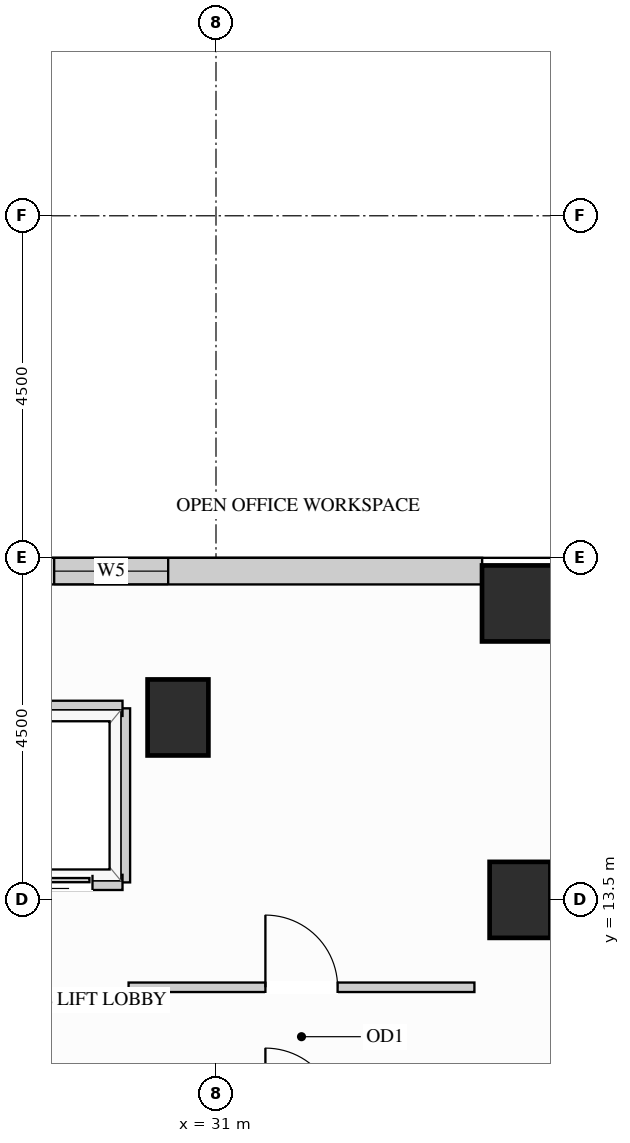
"""IFC4 building model, lengths in metres.
Left out: names, types, materials, properties, quantities, classifications, styles, units other than length and angle.
Written with IfcOpenShell. Run it as: python <this file> out.ifc"""

import sys

from ifc_helpers import new_model, si_unit, direction, frame, frame_2d, origin, origin_2d, place, context, subcontext, project, spatial, rectangle, extrude, source, transform, mapped, element, fill, save


model = new_model("IFC4")
c1 = context("Model", 3, precision=1e-05, world=origin(), true_north=direction((0.0, 1.0)))
c2 = subcontext(c1, "Body", "Model", "MODEL_VIEW")
j1 = project(units=[si_unit("LENGTHUNIT", "METRE"), si_unit("PLANEANGLEUNIT", "RADIAN")], contexts=[c1])
p1 = place(None, origin())
s1 = spatial("IfcSite", under=j1, at=p1, CompositionType="ELEMENT")
p2 = place(p1, origin())
s2 = spatial("IfcBuilding", under=s1, at=p2, CompositionType="ELEMENT")
p3 = place(p2, frame((0.0, 0.0, 204.3)))
s3 = spatial("IfcBuildingStorey", under=s2, at=p3, CompositionType="ELEMENT", Elevation=204.3)
m1 = source(origin(), c2, "Body", "SweptSolid", [
    extrude(rectangle(XDim=0.8, YDim=1.0, at=origin_2d()), origin(), (0.0, 0.0, 1.0), 3.32),
])
for number, where, z_axis, x_axis in (
    (1, (35.0, 13.5, 0.0), (0.0, 0.0, 1.0), (1.0, 0.0, 0.0)),
    (2, (30.5, 15.9, 0.0), (0.0, 0.0, 1.0), (1.0, 0.0, 0.0)),
):
    element("IfcColumn", number, at=place(p3, frame(where, z_axis=z_axis, x_axis=x_axis)), inside=s3, PredefinedType="COLUMN", context=c2, shape_type="MappedRepresentation", body=[
        mapped(m1, transform((0.0, 0.0, 0.0), x_axis=(1.0, 0.0, 0.0), y_axis=(0.0, 1.0, 0.0), z_axis=(0.0, 0.0, 1.0))),
    ])
m2 = source(origin(), c2, "Body", "SweptSolid", [
    extrude(rectangle(XDim=1.0, YDim=1.0, at=origin_2d()), origin(), (0.0, 0.0, 1.0), 3.32),
])
p4 = place(p3, frame((35.0, 17.4, 0.0), z_axis=(0.0, 0.0, 1.0), x_axis=(1.0, 0.0, 0.0)))
e3 = element("IfcColumn", 3, at=p4, inside=s3, PredefinedType="COLUMN", context=c2, shape_type="MappedRepresentation", body=[
    mapped(m2, transform((0.0, 0.0, 0.0), x_axis=(1.0, 0.0, 0.0), y_axis=(0.0, 1.0, 0.0), z_axis=(0.0, 0.0, 1.0))),
])
p5 = place(p3, frame((34.502, 17.825, 0.0), z_axis=(0.0, 0.0, 1.0), x_axis=(-1.0, 0.0, 0.0)))
e4 = element("IfcWall", 4, at=p5, inside=s3, PredefinedType="SOLIDWALL", context=c2, shape_type="SweptSolid", body=[
    extrude(rectangle(XDim=15.104, YDim=0.35, at=frame_2d((7.552, 0.0))), origin(), (0.0, 0.0, 1.0), 3.305),
])
p6 = place(p5, frame((4.131, 0.0, 0.78)))
e5 = element("IfcOpeningElement", 5, at=p6, cuts=e4, PredefinedType="OPENING", context=c2, shape_type="SweptSolid", body=[
    extrude(rectangle(XDim=1.5, YDim=2.0, at=frame_2d((0.75, 1.0))), frame((0.0, 0.185, 0.0), z_axis=(0.0, -1.0, 0.0), x_axis=(1.0, 0.0, 0.0)), (0.0, 0.0, 1.0), 0.37),
])
p7 = place(p5, frame((9.442, 0.0, 0.78)))
e6 = element("IfcOpeningElement", 6, at=p7, cuts=e4, PredefinedType="OPENING", context=c2, shape_type="SweptSolid", body=[
    extrude(rectangle(XDim=1.5, YDim=2.0, at=frame_2d((0.75, 1.0))), frame((0.0, 0.185, 0.0), z_axis=(0.0, -1.0, 0.0), x_axis=(1.0, 0.0, 0.0)), (0.0, 0.0, 1.0), 0.37),
])
p8 = place(p3, frame((29.85, 12.35, 0.0), z_axis=(0.0, 0.0, 1.0), x_axis=(1.0, 0.0, 0.0)))
e7 = element("IfcWall", 7, at=p8, inside=s3, PredefinedType="PARTITIONING", context=c2, shape_type="SweptSolid", body=[
    extrude(rectangle(XDim=4.55, YDim=0.125, at=frame_2d((2.275, 0.0))), origin(), (0.0, 0.0, 1.0), 3.305),
])
p9 = place(p8, frame((1.8, 0.0, 0.0)))
e8 = element("IfcOpeningElement", 8, at=p9, cuts=e7, PredefinedType="OPENING", context=c2, shape_type="SweptSolid", body=[
    extrude(rectangle(XDim=0.95, YDim=2.15, at=frame_2d((0.475, 1.075))), frame((0.0, 0.073, 0.0), z_axis=(0.0, -1.0, 0.0), x_axis=(1.0, 0.0, 0.0)), (0.0, 0.0, 1.0), 0.145),
])
m3 = source(origin(), c2, "Body", "SweptSolid", [
    extrude(rectangle(XDim=2.29, YDim=0.2, at=frame_2d((1.145, 0.0))), origin(), (0.0, 0.0, 1.0), 3.305),
])
p10 = place(p3, frame((29.77, 13.73, 0.0), z_axis=(0.0, 0.0, 1.0), x_axis=(0.0, 1.0, 0.0)))
e9 = element("IfcWall", 9, at=p10, inside=s3, PredefinedType="PARTITIONING", context=c2, shape_type="MappedRepresentation", body=[
    mapped(m3, transform((0.0, 0.0, 0.0), x_axis=(1.0, 0.0, 0.0), y_axis=(0.0, 1.0, 0.0), z_axis=(0.0, 0.0, 1.0))),
])
m4 = source(origin(), c2, "Body", "SweptSolid", [
    extrude(rectangle(XDim=1.89, YDim=0.2, at=frame_2d((0.945, 0.0))), origin(), (0.0, 0.0, 1.0), 2.693),
])
p11 = place(p3, frame((27.88, 16.02, 0.0), z_axis=(0.0, 0.0, 1.0), x_axis=(1.0, 0.0, 0.0)))
e10 = element("IfcWall", 10, at=p11, inside=s3, PredefinedType="PARTITIONING", context=c2, shape_type="MappedRepresentation", body=[
    mapped(m4, transform((0.0, 0.0, 0.0), x_axis=(1.0, 0.0, 0.0), y_axis=(0.0, 1.0, 0.0), z_axis=(0.0, 0.0, 1.0))),
])
p12 = place(p3, frame((27.88, 13.73, 0.0), z_axis=(0.0, 0.0, 1.0), x_axis=(1.0, 0.0, 0.0)))
e11 = element("IfcWall", 11, at=p12, inside=s3, PredefinedType="PARTITIONING", context=c2, shape_type="SweptSolid", body=[
    extrude(rectangle(XDim=1.89, YDim=0.2, at=frame_2d((0.945, 0.0))), origin(), (0.0, 0.0, 1.0), 2.386),
])
p13 = place(p12, frame((0.395, 0.0, 0.0)))
e12 = element("IfcOpeningElement", 12, at=p13, cuts=e11, PredefinedType="OPENING", context=c2, shape_type="SweptSolid", body=[
    extrude(rectangle(XDim=1.1, YDim=2.2, at=frame_2d((0.55, 1.1))), frame((0.0, 0.11, 0.0), z_axis=(0.0, -1.0, 0.0), x_axis=(1.0, 0.0, 0.0)), (0.0, 0.0, 1.0), 0.22),
])
m5 = source(origin(), c2, "Body", "SweptSolid", [
    extrude(rectangle(XDim=1.1, YDim=2.2, at=frame_2d((0.55, 1.1))), frame((0.0, 0.025, 0.0), z_axis=(0.0, -1.0, 0.0), x_axis=(1.0, 0.0, 0.0)), (0.0, 0.0, 1.0), 0.05),
])
p14 = place(p13, origin())
e13 = element("IfcDoor", 13, at=p14, inside=s3, OperationType="SLIDING_TO_LEFT", PredefinedType="DOOR", context=c2, shape_type="MappedRepresentation", body=[
    mapped(m5, transform((0.0, 0.0, 0.0), x_axis=(1.0, 0.0, 0.0), y_axis=(0.0, 1.0, 0.0), z_axis=(0.0, 0.0, 1.0))),
])
fill(e12, e13)
m6 = source(origin(), c2, "Body", "SweptSolid", [
    extrude(rectangle(XDim=0.95, YDim=2.15, at=frame_2d((0.475, 1.075))), frame((0.0, 0.025, 0.0), z_axis=(0.0, -1.0, 0.0), x_axis=(1.0, 0.0, 0.0)), (0.0, 0.0, 1.0), 0.05),
])
p15 = place(p9, origin())
e14 = element("IfcDoor", 14, at=p15, inside=s3, OperationType="SINGLE_SWING_LEFT", PredefinedType="DOOR", context=c2, shape_type="MappedRepresentation", body=[
    mapped(m6, transform((0.0, 0.0, 0.0), x_axis=(1.0, 0.0, 0.0), y_axis=(0.0, 1.0, 0.0), z_axis=(0.0, 0.0, 1.0))),
])
fill(e8, e14)
m7 = source(origin(), c2, "Body", "SweptSolid", [
    extrude(rectangle(XDim=1.5, YDim=2.0, at=frame_2d((0.75, 1.0))), frame((0.0, 0.03, 0.0), z_axis=(0.0, -1.0, 0.0), x_axis=(1.0, 0.0, 0.0)), (0.0, 0.0, 1.0), 0.06),
])
p16 = place(p6, origin())
e15 = element("IfcWindow", 15, at=p16, inside=s3, PartitioningType="SINGLE_PANEL", PredefinedType="WINDOW", context=c2, shape_type="MappedRepresentation", body=[
    mapped(m7, transform((0.0, 0.0, 0.0), x_axis=(1.0, 0.0, 0.0), y_axis=(0.0, 1.0, 0.0), z_axis=(0.0, 0.0, 1.0))),
])
fill(e5, e15)
save(model, sys.argv[1])
